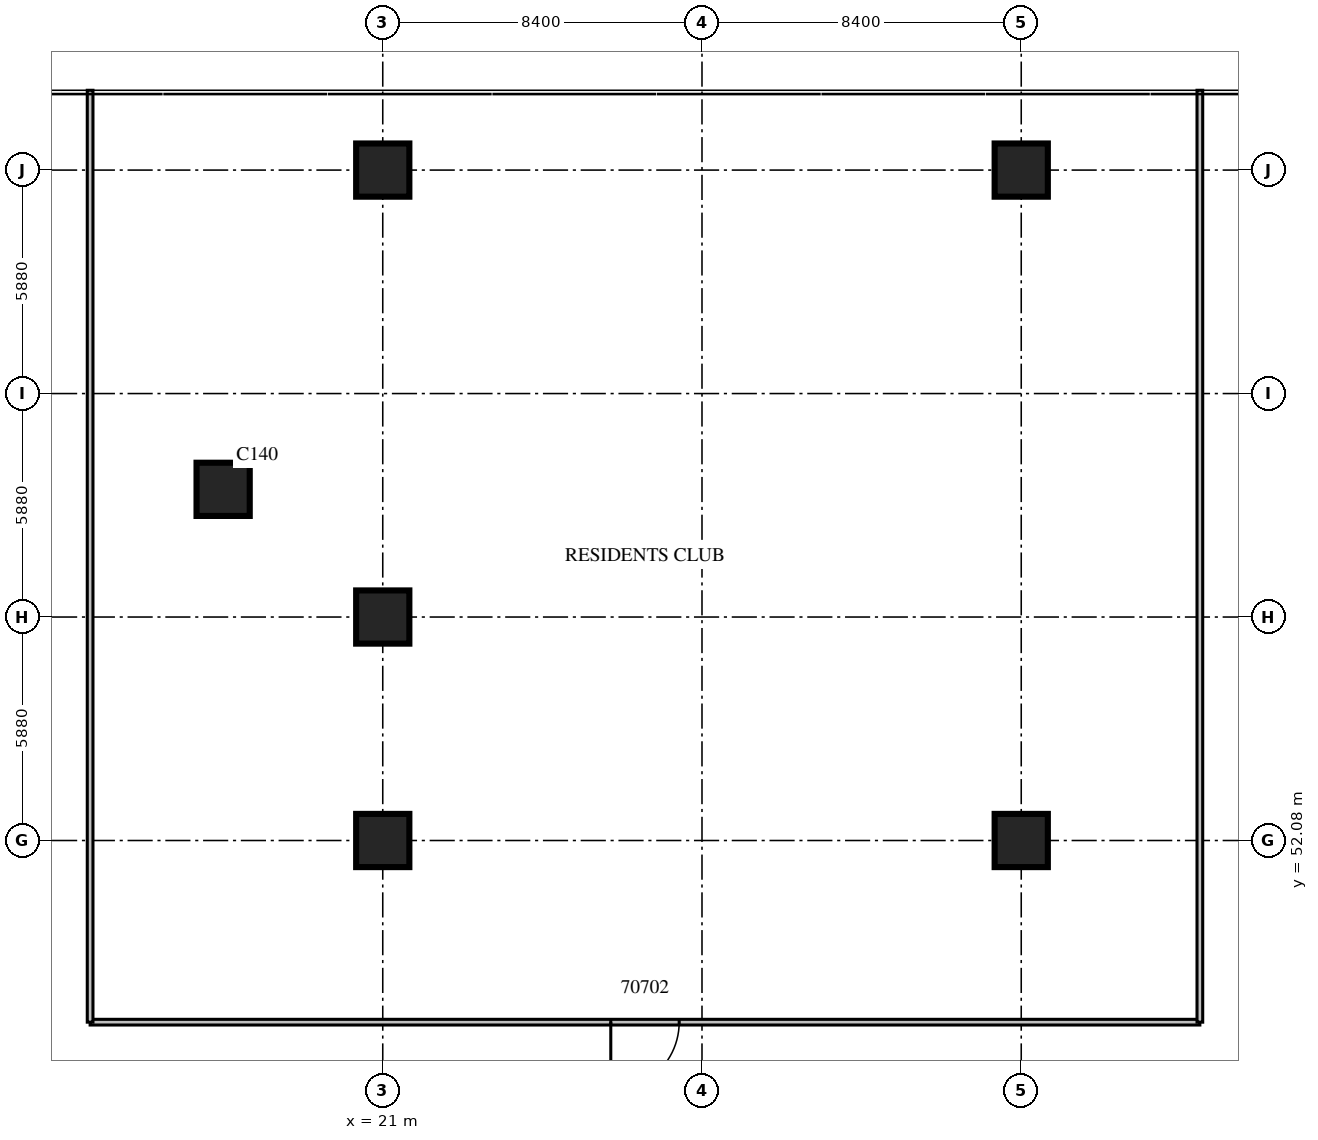
"""IFC4 building model, lengths in metres.
Left out: names, types, materials, properties, quantities, classifications, styles, units other than length and angle.
Written with IfcOpenShell. Run it as: python <this file> out.ifc"""

import sys

from ifc_helpers import new_model, si_unit, direction, frame, frame_2d, origin, origin_2d, place, context, subcontext, project, spatial, rectangle, extrude, source, transform, mapped, element, fill, save


model = new_model("IFC4")
c1 = context("Model", 3, precision=1e-05, world=origin(), true_north=direction((0.0, 1.0)))
c2 = subcontext(c1, "Body", "Model", "MODEL_VIEW")
j1 = project(units=[si_unit("LENGTHUNIT", "METRE"), si_unit("PLANEANGLEUNIT", "RADIAN")], contexts=[c1])
p1 = place(None, origin())
s1 = spatial("IfcSite", under=j1, at=p1, CompositionType="ELEMENT")
p2 = place(p1, origin())
s2 = spatial("IfcBuilding", under=s1, at=p2, CompositionType="ELEMENT")
p3 = place(p2, frame((0.0, 0.0, 23.7)))
s3 = spatial("IfcBuildingStorey", under=s2, at=p3, CompositionType="ELEMENT", Elevation=23.7)
m1 = source(origin(), c2, "Body", "SweptSolid", [
    extrude(rectangle(XDim=1.4, YDim=1.4, at=origin_2d()), origin(), (0.0, 0.0, 1.0), 5.4),
])
for number, where, z_axis, x_axis in (
    (1, (16.8, 61.32, 0.0), (0.0, 0.0, 1.0), (1.0, 0.0, 0.0)),
    (2, (21.0, 52.08, 0.0), (0.0, 0.0, 1.0), (1.0, 0.0, 0.0)),
    (3, (21.0, 57.96, 0.0), (0.0, 0.0, 1.0), (1.0, 0.0, 0.0)),
    (4, (21.0, 69.72, 0.0), (0.0, 0.0, 1.0), (1.0, 0.0, 0.0)),
    (5, (37.8, 52.08, 0.0), (0.0, 0.0, 1.0), (1.0, 0.0, 0.0)),
    (6, (37.8, 69.72, 0.0), (0.0, 0.0, 1.0), (1.0, 0.0, 0.0)),
):
    element("IfcColumn", number, at=place(p3, frame(where, z_axis=z_axis, x_axis=x_axis)), inside=s3, PredefinedType="COLUMN", context=c2, shape_type="MappedRepresentation", body=[
        mapped(m1, transform((0.0, 0.0, 0.0), scale=1.0)),
    ])
m2 = source(origin(), c2, "Body", "SweptSolid", [
    extrude(rectangle(XDim=29.2, YDim=0.15, at=frame_2d((14.6, 0.0))), origin(), (0.0, 0.0, 1.0), 4.8),
])
p4 = place(p3, frame((13.3, 47.3, 0.0), z_axis=(0.0, 0.0, 1.0), x_axis=(1.0, 0.0, 0.0)))
e7 = element("IfcWall", 7, at=p4, inside=s3, PredefinedType="PARTITIONING", context=c2, shape_type="MappedRepresentation", body=[
    mapped(m2, transform((0.0, 0.0, 0.0), scale=1.0)),
])
m3 = source(origin(), c2, "Body", "SweptSolid", [
    extrude(rectangle(XDim=1.8, YDim=2.1, at=frame_2d((0.9, 1.05))), frame((0.0, 0.085, 0.0), z_axis=(0.0, -1.0, 0.0), x_axis=(1.0, 0.0, 0.0)), (0.0, 0.0, 1.0), 0.17),
])
p5 = place(p4, frame((13.7, 0.0, 0.0)))
e8 = element("IfcOpeningElement", 8, at=p5, cuts=e7, PredefinedType="OPENING", context=c2, shape_type="MappedRepresentation", body=[
    mapped(m3, transform((0.0, 0.0, 0.0), scale=1.0)),
])
m4 = source(origin(), c2, "Body", "SweptSolid", [
    extrude(rectangle(XDim=24.52, YDim=0.15, at=frame_2d((12.26, 0.0))), origin(), (0.0, 0.0, 1.0), 4.8),
])
for number, where, z_axis, x_axis in (
    (9, (13.3, 47.3, 0.0), (0.0, 0.0, 1.0), (0.0, 1.0, 0.0)),
    (10, (42.5, 47.3, 0.0), (0.0, 0.0, 1.0), (0.0, 1.0, 0.0)),
):
    element("IfcWall", number, at=place(p3, frame(where, z_axis=z_axis, x_axis=x_axis)), inside=s3, PredefinedType="PARTITIONING", context=c2, shape_type="MappedRepresentation", body=[
        mapped(m4, transform((0.0, 0.0, 0.0), scale=1.0)),
    ])
m5 = source(origin(), c2, "Body", "SweptSolid", [
    extrude(rectangle(XDim=1.8, YDim=2.1, at=frame_2d((0.9, 1.05))), frame((0.0, 0.025, 0.0), z_axis=(0.0, -1.0, 0.0), x_axis=(1.0, 0.0, 0.0)), (0.0, 0.0, 1.0), 0.05),
])
p6 = place(p5, origin())
e11 = element("IfcDoor", 11, at=p6, inside=s3, OperationType="DOUBLE_DOOR_SINGLE_SWING", PredefinedType="DOOR", context=c2, shape_type="MappedRepresentation", body=[
    mapped(m5, transform((0.0, 0.0, 0.0), scale=1.0)),
])
fill(e8, e11)
save(model, sys.argv[1])
